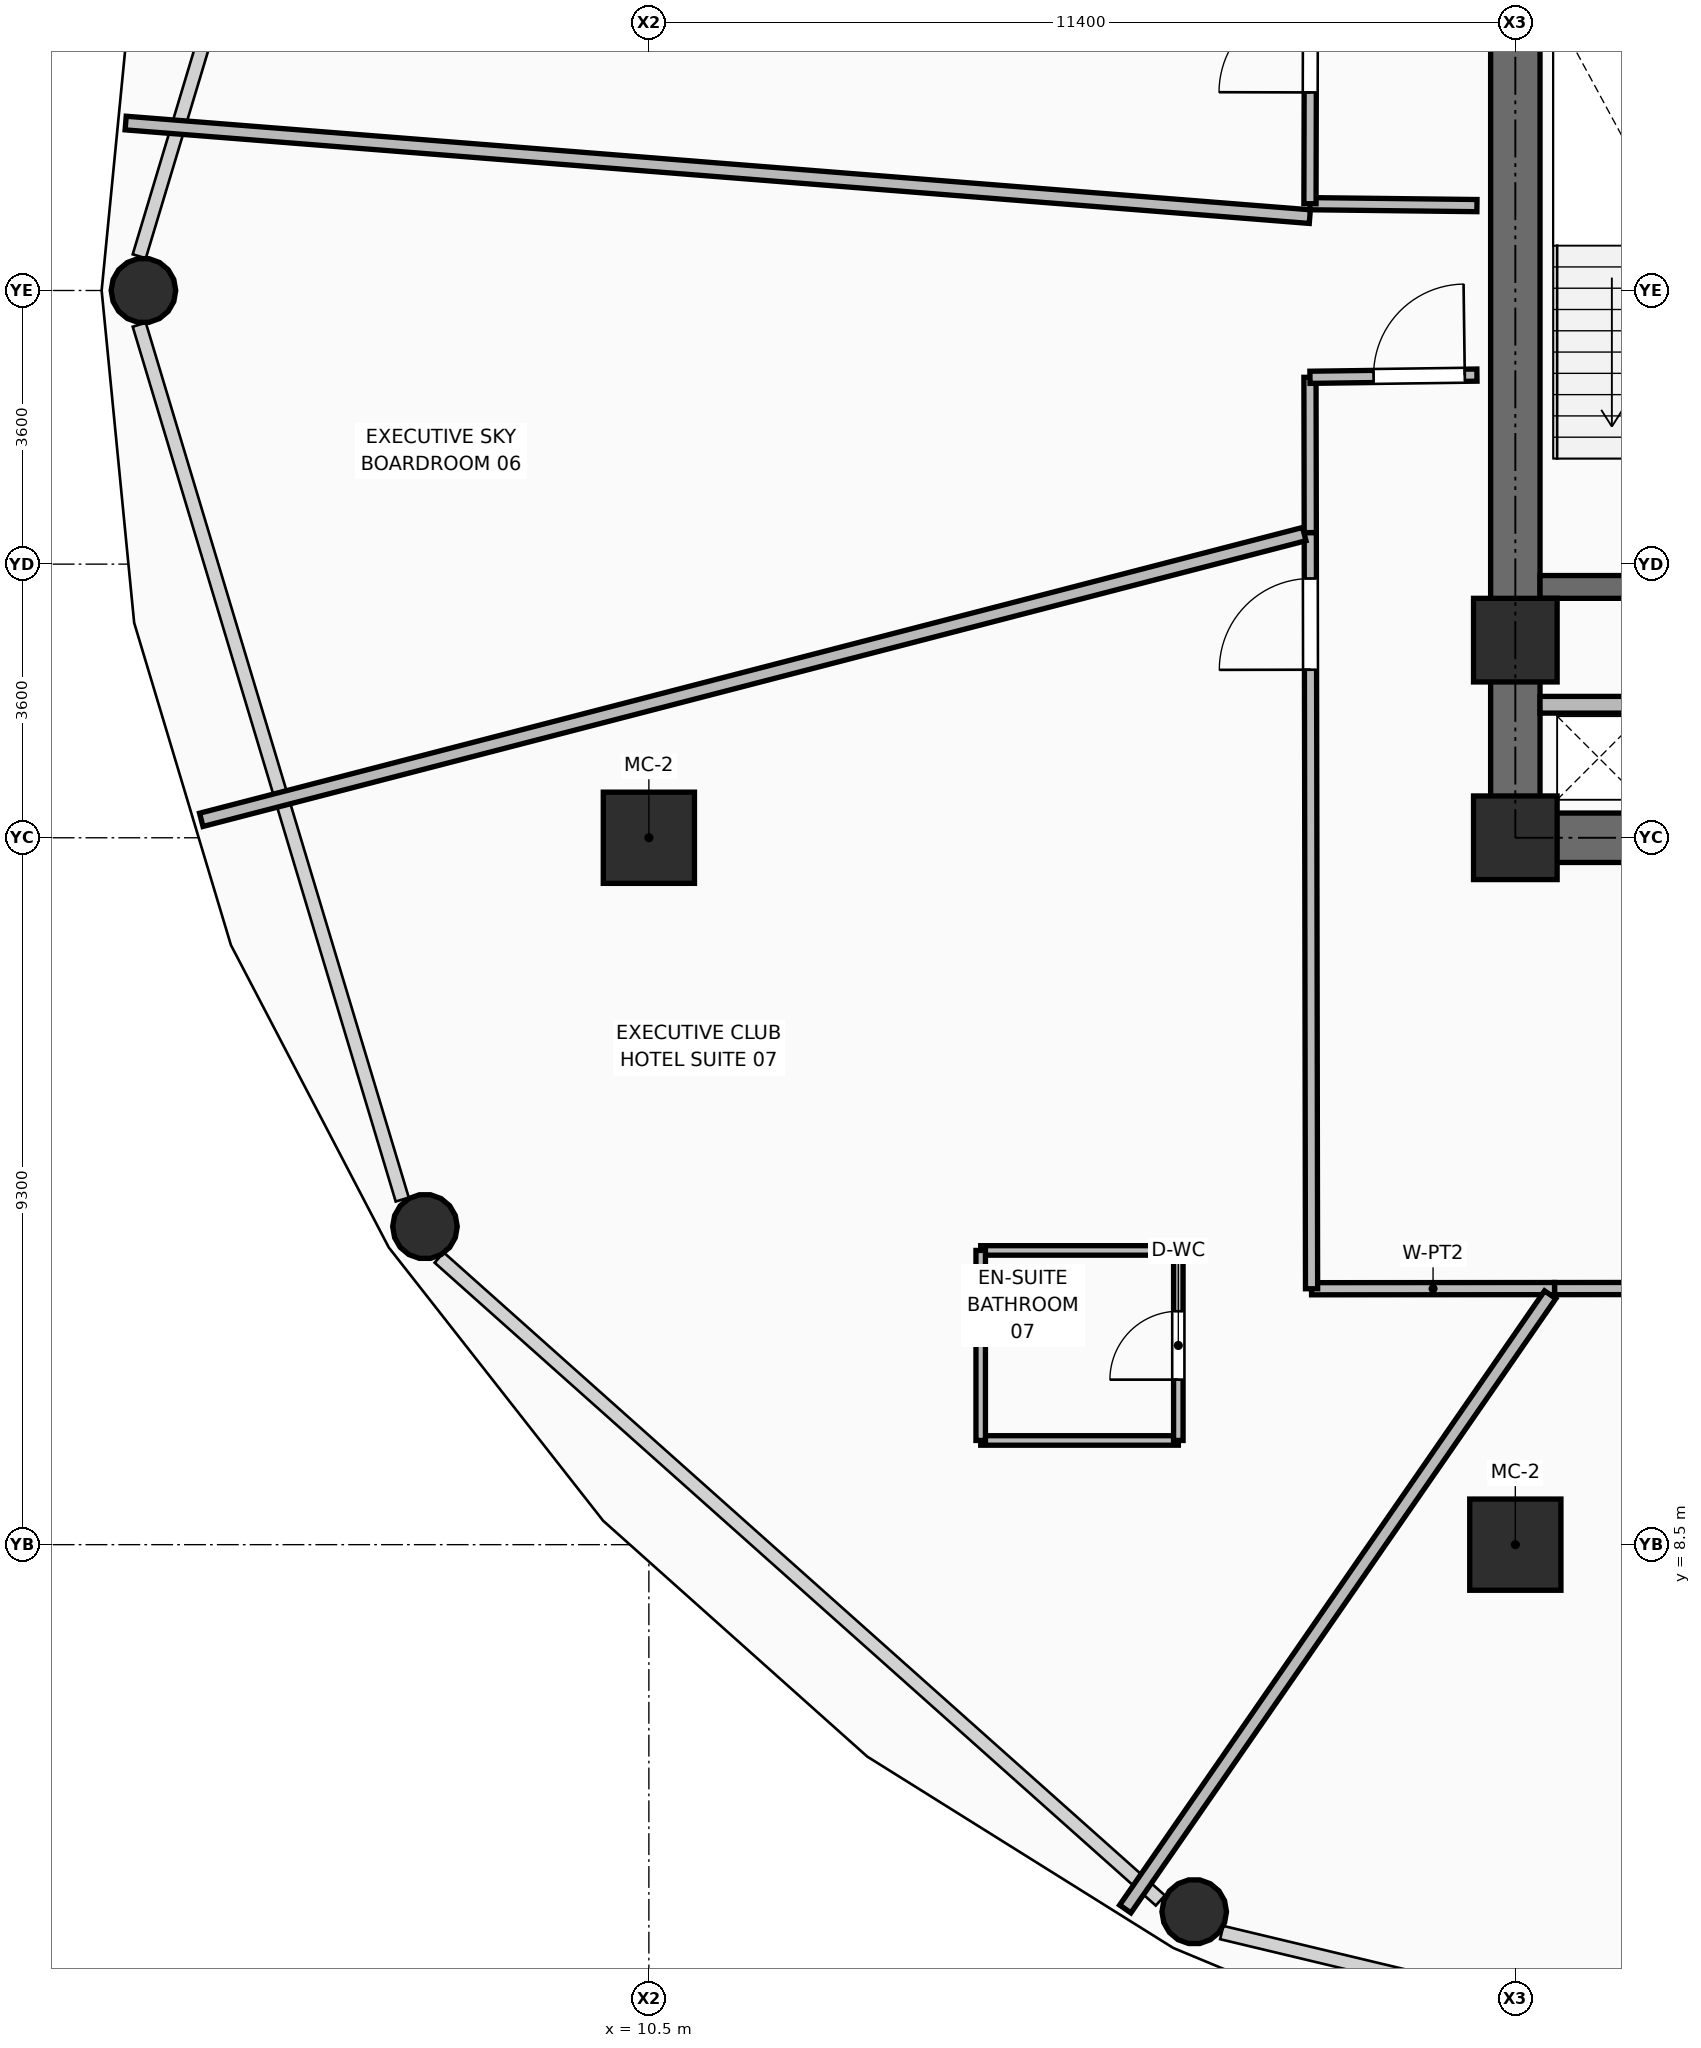
"""IFC4 building model, lengths in metres.
Left out: names, types, materials, properties, quantities, classifications, styles, units other than length and angle.
Written with IfcOpenShell. Run it as: python <this file> out.ifc"""

import sys

from ifc_helpers import new_model, si_unit, direction, frame, frame_2d, origin, origin_2d, place, context, subcontext, project, spatial, rectangle, hollow_rectangle, hollow_circle, extrude, element, fill, save


model = new_model("IFC4")
c1 = context("Model", 3, precision=1e-05, world=origin(), true_north=direction((0.0, 1.0)))
c2 = subcontext(c1, "Body", "Model", "MODEL_VIEW")
j1 = project(units=[si_unit("LENGTHUNIT", "METRE"), si_unit("PLANEANGLEUNIT", "RADIAN")], contexts=[c1])
p1 = place(None, origin())
s1 = spatial("IfcSite", under=j1, at=p1, CompositionType="ELEMENT")
p2 = place(p1, origin())
s2 = spatial("IfcBuilding", under=s1, at=p2, CompositionType="ELEMENT")
p3 = place(p2, frame((0.0, 0.0, 72.0)))
s3 = spatial("IfcBuildingStorey", under=s2, at=p3, CompositionType="ELEMENT", Elevation=72.0)
for number, where, z_axis, x_axis in (
    (1, (21.9, 17.8, 0.0), (0.0, 0.0, 1.0), (1.0, 0.0, 0.0)),
    (2, (21.9, 20.4, 0.0), (0.0, 0.0, 1.0), (1.0, 0.0, 0.0)),
):
    element("IfcColumn", number, at=place(p3, frame(where, z_axis=z_axis, x_axis=x_axis)), inside=s3, PredefinedType="COLUMN", context=c2, shape_type="SweptSolid", body=[
        extrude(rectangle(XDim=1.1, YDim=1.1, at=origin_2d()), origin(), (0.0, 0.0, 1.0), 3.75),
    ])
for number, where, z_axis, x_axis in (
    (3, (21.9, 8.5, 0.0), (0.0, 0.0, 1.0), (1.0, 0.0, 0.0)),
    (4, (10.5, 17.8, 0.0), (0.0, 0.0, 1.0), (1.0, 0.0, 0.0)),
):
    element("IfcColumn", number, at=place(p3, frame(where, z_axis=z_axis, x_axis=x_axis)), inside=s3, PredefinedType="COLUMN", context=c2, shape_type="SweptSolid", body=[
        extrude(hollow_rectangle(XDim=1.2, YDim=1.2, WallThickness=0.045, at=origin_2d()), origin(), (0.0, 0.0, 1.0), 3.75),
    ])
for number, where, z_axis, x_axis in (
    (5, (3.85, 25.0, 0.0), (0.0, 0.0, 1.0), (1.0, 0.0, 0.0)),
    (6, (7.554, 12.685, 0.0), (0.0, 0.0, 1.0), (1.0, 0.0, 0.0)),
    (7, (17.675, 3.671, 0.0), (0.0, 0.0, 1.0), (1.0, 0.0, 0.0)),
):
    element("IfcColumn", number, at=place(p3, frame(where, z_axis=z_axis, x_axis=x_axis)), inside=s3, PredefinedType="COLUMN", context=c2, shape_type="SweptSolid", body=[
        extrude(hollow_circle(Radius=0.425, WallThickness=0.04, at=origin_2d()), origin(), (0.0, 0.0, 1.0), 3.57),
    ])
p4 = place(p3, frame((21.575, 17.8, 0.0), z_axis=(0.0, 0.0, 1.0), x_axis=(1.0, 0.0, 0.0)))
e8 = element("IfcWall", 8, at=p4, inside=s3, PredefinedType="SHEAR", context=c2, shape_type="SweptSolid", body=[
    extrude(rectangle(XDim=2.175, YDim=0.65, at=frame_2d((1.087, 0.0))), origin(), (0.0, 0.0, 1.0), 3.57),
])
p5 = place(p3, frame((21.9, 18.125, 0.0), z_axis=(0.0, 0.0, 1.0), x_axis=(0.0, 1.0, 0.0)))
e9 = element("IfcWall", 9, at=p5, inside=s3, PredefinedType="SHEAR", context=c2, shape_type="SweptSolid", body=[
    extrude(rectangle(XDim=14.0, YDim=0.65, at=frame_2d((7.0, 0.0))), origin(), (0.0, 0.0, 1.0), 3.57),
])
p6 = place(p3, frame((22.225, 21.1, 0.0), z_axis=(0.0, 0.0, 1.0), x_axis=(1.0, 0.0, 0.0)))
e10 = element("IfcWall", 10, at=p6, inside=s3, PredefinedType="SHEAR", context=c2, shape_type="SweptSolid", body=[
    extrude(rectangle(XDim=3.515, YDim=0.3, at=frame_2d((1.757, 0.0))), origin(), (0.0, 0.0, 1.0), 3.57),
])
p7 = place(p6, frame((1.995, 0.0, 0.0)))
e11 = element("IfcOpeningElement", 11, at=p7, cuts=e10, PredefinedType="OPENING", context=c2, shape_type="SweptSolid", body=[
    extrude(rectangle(XDim=1.05, YDim=2.1, at=frame_2d((0.525, 1.05))), frame((0.0, 0.16, 0.0), z_axis=(0.0, -1.0, 0.0), x_axis=(1.0, 0.0, 0.0)), (0.0, 0.0, 1.0), 0.32),
])
p8 = place(p3, frame((22.225, 19.55, 0.0), z_axis=(0.0, 0.0, 1.0), x_axis=(1.0, 0.0, 0.0)))
e12 = element("IfcWall", 12, at=p8, inside=s3, PredefinedType="PARTITIONING", context=c2, shape_type="SweptSolid", body=[
    extrude(rectangle(XDim=1.565, YDim=0.22, at=frame_2d((0.782, 0.0))), origin(), (0.0, 0.0, 1.0), 2.595),
])
p9 = place(p3, frame((21.395, 26.117, 0.0), z_axis=(0.0, 0.0, 1.0), x_axis=(-0.999934504226, 0.011444966545, 0.0)))
e13 = element("IfcWall", 13, at=p9, inside=s3, PredefinedType="PARTITIONING", context=c2, shape_type="SweptSolid", body=[
    extrude(rectangle(XDim=2.197, YDim=0.16, at=frame_2d((1.099, 0.0))), origin(), (0.0, 0.0, 1.0), 3.55),
])
p10 = place(p3, frame((19.198, 26.142, 0.0), z_axis=(0.0, 0.0, 1.0), x_axis=(0.002342582991, 0.999997256149, 0.0)))
e14 = element("IfcWall", 14, at=p10, inside=s3, PredefinedType="PARTITIONING", context=c2, shape_type="SweptSolid", body=[
    extrude(rectangle(XDim=4.273, YDim=0.16, at=frame_2d((2.136, 0.0))), origin(), (0.0, 0.0, 1.0), 3.55),
])
p11 = place(p10, frame((1.464, 0.0, 0.0)))
e15 = element("IfcOpeningElement", 15, at=p11, cuts=e14, PredefinedType="OPENING", context=c2, shape_type="SweptSolid", body=[
    extrude(rectangle(XDim=1.2, YDim=2.1, at=frame_2d((0.6, 1.05))), frame((0.0, 0.09, 0.0), z_axis=(0.0, -1.0, 0.0), x_axis=(1.0, 0.0, 0.0)), (0.0, 0.0, 1.0), 0.18),
])
p12 = place(p3, frame((34.062, 11.877, 0.0), z_axis=(0.0, 0.0, 1.0), x_axis=(-0.99999976071, -0.000691794728, 0.0)))
e16 = element("IfcWall", 16, at=p12, inside=s3, PredefinedType="PARTITIONING", context=c2, shape_type="SweptSolid", body=[
    extrude(rectangle(XDim=11.646, YDim=0.16, at=frame_2d((5.823, 0.0))), origin(), (0.0, 0.0, 1.0), 2.928),
])
p13 = place(p12, frame((5.223, 0.0, 0.0)))
e17 = element("IfcOpeningElement", 17, at=p13, cuts=e16, PredefinedType="OPENING", context=c2, shape_type="SweptSolid", body=[
    extrude(rectangle(XDim=1.2, YDim=2.1, at=frame_2d((0.6, 1.05))), frame((0.0, 0.09, 0.0), z_axis=(0.0, -1.0, 0.0), x_axis=(1.0, 0.0, 0.0)), (0.0, 0.0, 1.0), 0.18),
])
p14 = place(p3, frame((22.416, 11.869, 0.0), z_axis=(0.0, 0.0, 1.0), x_axis=(-0.999999813388, -0.000610920085, 0.0)))
e18 = element("IfcWall", 18, at=p14, inside=s3, PredefinedType="PARTITIONING", context=c2, shape_type="SweptSolid", body=[
    extrude(rectangle(XDim=3.197, YDim=0.16, at=frame_2d((1.599, 0.0))), origin(), (0.0, 0.0, 1.0), 2.928),
])
p15 = place(p3, frame((19.219, 11.867, 0.0), z_axis=(0.0, 0.0, 1.0), x_axis=(-0.001717915349, 0.999998524382, 0.0)))
e19 = element("IfcWall", 19, at=p15, inside=s3, PredefinedType="PARTITIONING", context=c2, shape_type="SweptSolid", body=[
    extrude(rectangle(XDim=9.948, YDim=0.16, at=frame_2d((4.974, 0.0))), origin(), (0.0, 0.0, 1.0), 2.928),
])
p16 = place(p15, frame((8.144, 0.0, 0.0)))
e20 = element("IfcOpeningElement", 20, at=p16, cuts=e19, PredefinedType="OPENING", context=c2, shape_type="SweptSolid", body=[
    extrude(rectangle(XDim=1.2, YDim=2.1, at=frame_2d((0.6, 1.05))), frame((0.0, 0.09, 0.0), z_axis=(0.0, -1.0, 0.0), x_axis=(1.0, 0.0, 0.0)), (0.0, 0.0, 1.0), 0.18),
])
p17 = place(p3, frame((19.202, 21.815, 0.0), z_axis=(0.0, 0.0, 1.0), x_axis=(-0.001912042394, 0.999998172045, 0.0)))
e21 = element("IfcWall", 21, at=p17, inside=s3, PredefinedType="PARTITIONING", context=c2, shape_type="SweptSolid", body=[
    extrude(rectangle(XDim=2.043, YDim=0.16, at=frame_2d((1.021, 0.0))), origin(), (0.0, 0.0, 1.0), 3.55),
])
p18 = place(p3, frame((19.198, 23.858, 0.0), z_axis=(0.0, 0.0, 1.0), x_axis=(0.999912578456, 0.013222535486, 0.0)))
e22 = element("IfcWall", 22, at=p18, inside=s3, PredefinedType="PARTITIONING", context=c2, shape_type="SweptSolid", body=[
    extrude(rectangle(XDim=2.197, YDim=0.16, at=frame_2d((1.099, 0.0))), origin(), (0.0, 0.0, 1.0), 3.55),
])
p19 = place(p18, frame((0.837, 0.0, 0.0)))
e23 = element("IfcOpeningElement", 23, at=p19, cuts=e22, PredefinedType="OPENING", context=c2, shape_type="SweptSolid", body=[
    extrude(rectangle(XDim=1.2, YDim=2.1, at=frame_2d((0.6, 1.05))), frame((0.0, 0.09, 0.0), z_axis=(0.0, -1.0, 0.0), x_axis=(1.0, 0.0, 0.0)), (0.0, 0.0, 1.0), 0.18),
])
p20 = place(p3, frame((19.196, 25.972, 0.0), z_axis=(0.0, 0.0, 1.0), x_axis=(-0.996893373325, 0.078762949547, 0.0)))
e24 = element("IfcWall", 24, at=p20, inside=s3, PredefinedType="PARTITIONING", context=c2, shape_type="SweptSolid", body=[
    extrude(rectangle(XDim=15.629, YDim=0.18, at=frame_2d((7.814, 0.0))), origin(), (0.0, 0.0, 1.0), 2.775),
])
p21 = place(p3, frame((19.123, 21.795, 0.0), z_axis=(0.0, 0.0, 1.0), x_axis=(-0.968050799349, -0.250754162238, 0.0)))
e25 = element("IfcWall", 25, at=p21, inside=s3, PredefinedType="PARTITIONING", context=c2, shape_type="SweptSolid", body=[
    extrude(rectangle(XDim=14.991, YDim=0.18, at=frame_2d((7.496, 0.0))), origin(), (0.0, 0.0, 1.0), 2.775),
])
p22 = place(p3, frame((22.359, 11.788, 0.0), z_axis=(0.0, 0.0, 1.0), x_axis=(-0.568951562239, -0.822371035376, 0.0)))
e26 = element("IfcWall", 26, at=p22, inside=s3, PredefinedType="PARTITIONING", context=c2, shape_type="SweptSolid", body=[
    extrude(rectangle(XDim=9.826, YDim=0.18, at=frame_2d((4.913, 0.0))), origin(), (0.0, 0.0, 1.0), 2.775),
])
for number, where, z_axis, x_axis in (
    (27, (14.866, 9.871, 0.0), (0.0, 0.0, 1.0), (1.0, 0.0, 0.0)),
    (28, (14.866, 12.371, 0.0), (0.0, 0.0, 1.0), (1.0, 0.0, 0.0)),
):
    element("IfcWall", number, at=place(p3, frame(where, z_axis=z_axis, x_axis=x_axis)), inside=s3, PredefinedType="PARTITIONING", context=c2, shape_type="SweptSolid", body=[
        extrude(rectangle(XDim=2.6, YDim=0.125, at=frame_2d((1.3, 0.0))), origin(), (0.0, 0.0, 1.0), 3.55),
    ])
p23 = place(p3, frame((14.866, 9.871, 0.0), z_axis=(0.0, 0.0, 1.0), x_axis=(0.0, 1.0, 0.0)))
e29 = element("IfcWall", 29, at=p23, inside=s3, PredefinedType="PARTITIONING", context=c2, shape_type="SweptSolid", body=[
    extrude(rectangle(XDim=2.5, YDim=0.125, at=frame_2d((1.25, 0.0))), origin(), (0.0, 0.0, 1.0), 3.55),
])
p24 = place(p3, frame((17.466, 9.871, 0.0), z_axis=(0.0, 0.0, 1.0), x_axis=(0.0, 1.0, 0.0)))
e30 = element("IfcWall", 30, at=p24, inside=s3, PredefinedType="PARTITIONING", context=c2, shape_type="SweptSolid", body=[
    extrude(rectangle(XDim=2.5, YDim=0.125, at=frame_2d((1.25, 0.0))), origin(), (0.0, 0.0, 1.0), 3.55),
])
p25 = place(p24, frame((0.8, 0.0, 0.0)))
e31 = element("IfcOpeningElement", 31, at=p25, cuts=e30, PredefinedType="OPENING", context=c2, shape_type="SweptSolid", body=[
    extrude(rectangle(XDim=0.9, YDim=2.1, at=frame_2d((0.45, 1.05))), frame((0.0, 0.073, 0.0), z_axis=(0.0, -1.0, 0.0), x_axis=(1.0, 0.0, 0.0)), (0.0, 0.0, 1.0), 0.145),
])
p26 = place(p11, origin())
e32 = element("IfcDoor", 32, at=p26, inside=s3, OperationType="SINGLE_SWING_LEFT", PredefinedType="DOOR", context=c2, shape_type="SweptSolid", body=[
    extrude(rectangle(XDim=1.2, YDim=2.1, at=frame_2d((0.6, 1.05))), frame((0.0, 0.025, 0.0), z_axis=(0.0, -1.0, 0.0), x_axis=(1.0, 0.0, 0.0)), (0.0, 0.0, 1.0), 0.05),
])
fill(e15, e32)
p27 = place(p19, origin())
e33 = element("IfcDoor", 33, at=p27, inside=s3, OperationType="SINGLE_SWING_RIGHT", PredefinedType="DOOR", context=c2, shape_type="SweptSolid", body=[
    extrude(rectangle(XDim=1.2, YDim=2.1, at=frame_2d((0.6, 1.05))), frame((0.0, 0.025, 0.0), z_axis=(0.0, -1.0, 0.0), x_axis=(1.0, 0.0, 0.0)), (0.0, 0.0, 1.0), 0.05),
])
fill(e23, e33)
p28 = place(p25, origin())
e34 = element("IfcDoor", 34, at=p28, inside=s3, OperationType="SINGLE_SWING_LEFT", PredefinedType="DOOR", context=c2, shape_type="SweptSolid", body=[
    extrude(rectangle(XDim=0.9, YDim=2.1, at=frame_2d((0.45, 1.05))), frame((0.0, 0.025, 0.0), z_axis=(0.0, -1.0, 0.0), x_axis=(1.0, 0.0, 0.0)), (0.0, 0.0, 1.0), 0.05),
])
fill(e31, e34)
p29 = place(p16, origin())
e35 = element("IfcDoor", 35, at=p29, inside=s3, OperationType="SINGLE_SWING_LEFT", PredefinedType="DOOR", context=c2, shape_type="SweptSolid", body=[
    extrude(rectangle(XDim=1.2, YDim=2.1, at=frame_2d((0.6, 1.05))), frame((0.0, 0.025, 0.0), z_axis=(0.0, -1.0, 0.0), x_axis=(1.0, 0.0, 0.0)), (0.0, 0.0, 1.0), 0.05),
])
fill(e20, e35)
save(model, sys.argv[1])
